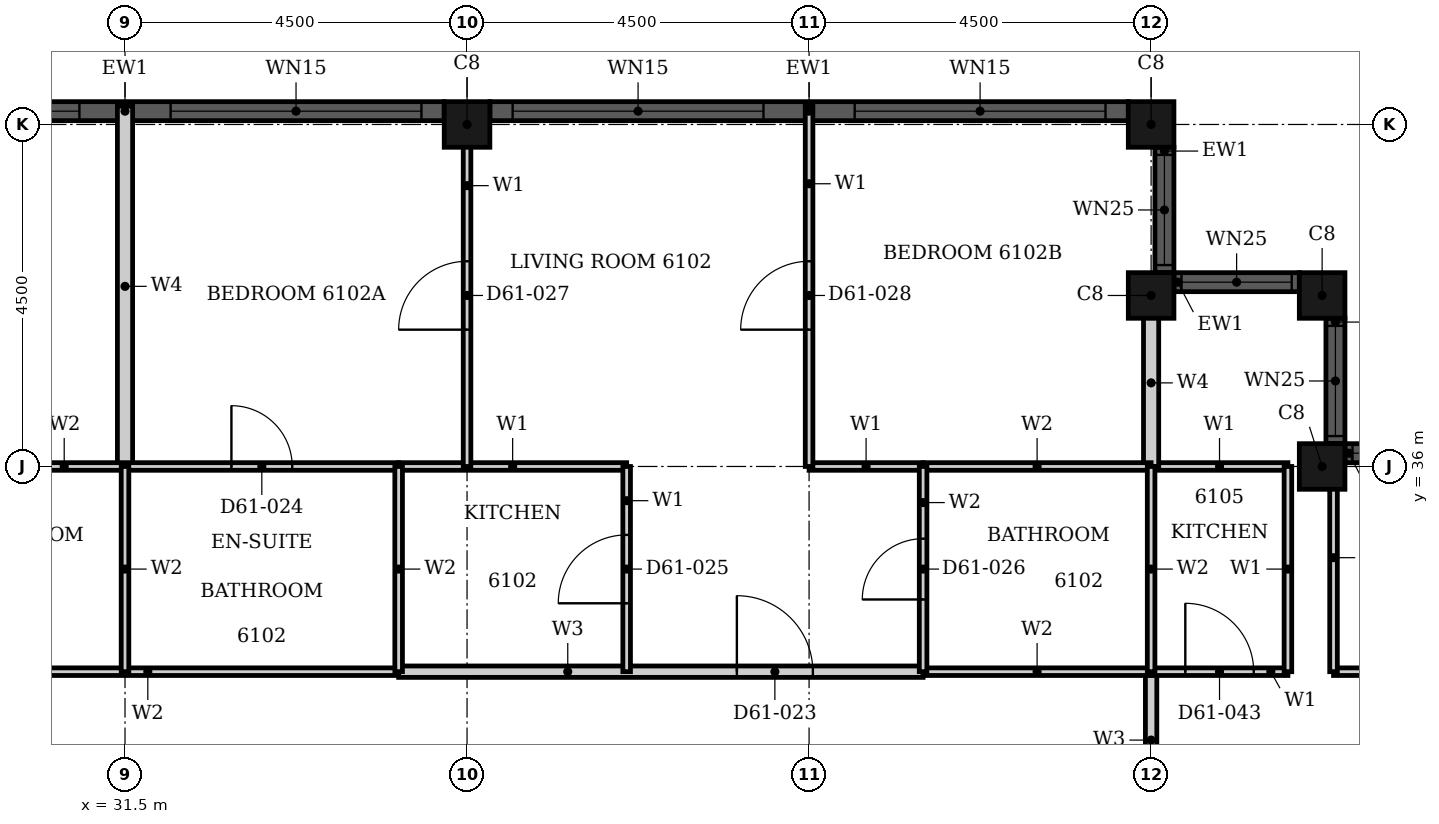
"""IFC4 building model, lengths in metres.
Left out: names, types, materials, properties, quantities, classifications, styles, units other than length and angle.
Written with IfcOpenShell. Run it as: python <this file> out.ifc"""

import sys

from ifc_helpers import new_model, si_unit, direction, frame, frame_2d, origin, origin_2d, place, context, subcontext, project, spatial, rectangle, hollow_rectangle, extrude, element, fill, save


model = new_model("IFC4")
c1 = context("Model", 3, precision=1e-05, world=origin(), true_north=direction((0.0, 1.0)))
c2 = subcontext(c1, "Body", "Model", "MODEL_VIEW")
j1 = project(units=[si_unit("LENGTHUNIT", "METRE"), si_unit("PLANEANGLEUNIT", "RADIAN")], contexts=[c1])
p1 = place(None, origin())
s1 = spatial("IfcSite", under=j1, at=p1, CompositionType="ELEMENT")
p2 = place(p1, origin())
s2 = spatial("IfcBuilding", under=s1, at=p2, CompositionType="ELEMENT")
p3 = place(p2, frame((0.0, 0.0, 241.6)))
s3 = spatial("IfcBuildingStorey", under=s2, at=p3, CompositionType="ELEMENT", Elevation=241.6)
for number, where, z_axis, x_axis in (
    (1, (47.25, 36.0, 0.0), (0.0, 0.0, 1.0), (1.0, 0.0, 0.0)),
    (2, (47.25, 38.25, 0.0), (0.0, 0.0, 1.0), (1.0, 0.0, 0.0)),
    (3, (45.0, 38.25, 0.0), (0.0, 0.0, 1.0), (1.0, 0.0, 0.0)),
    (4, (45.0, 40.5, 0.0), (0.0, 0.0, 1.0), (1.0, 0.0, 0.0)),
    (5, (36.0, 40.5, 0.0), (0.0, 0.0, 1.0), (1.0, 0.0, 0.0)),
):
    element("IfcColumn", number, at=place(p3, frame(where, z_axis=z_axis, x_axis=x_axis)), inside=s3, PredefinedType="COLUMN", context=c2, shape_type="SweptSolid", body=[
        extrude(hollow_rectangle(XDim=0.6, YDim=0.6, WallThickness=0.02, at=origin_2d()), origin(), (0.0, 0.0, 1.0), 3.7),
    ])
p4 = place(p3, frame((49.2, 36.175, 0.0), z_axis=(0.0, 0.0, 1.0), x_axis=(-1.0, 0.0, 0.0)))
e6 = element("IfcWall", 6, at=p4, inside=s3, PredefinedType="SOLIDWALL", context=c2, shape_type="SweptSolid", body=[
    extrude(rectangle(XDim=1.65, YDim=0.25, at=frame_2d((0.825, 0.0))), origin(), (0.0, 0.0, 1.0), 3.7),
])
p5 = place(p4, frame((0.1, 0.0, 0.9)))
e7 = element("IfcOpeningElement", 7, at=p5, cuts=e6, PredefinedType="OPENING", context=c2, shape_type="SweptSolid", body=[
    extrude(rectangle(XDim=1.45, YDim=1.85, at=frame_2d((0.725, 0.925))), frame((0.0, 0.135, 0.0), z_axis=(0.0, -1.0, 0.0), x_axis=(1.0, 0.0, 0.0)), (0.0, 0.0, 1.0), 0.27),
])
p6 = place(p3, frame((47.425, 36.3, 0.0), z_axis=(0.0, 0.0, 1.0), x_axis=(0.0, 1.0, 0.0)))
e8 = element("IfcWall", 8, at=p6, inside=s3, PredefinedType="SOLIDWALL", context=c2, shape_type="SweptSolid", body=[
    extrude(rectangle(XDim=1.65, YDim=0.25, at=frame_2d((0.825, 0.0))), origin(), (0.0, 0.0, 1.0), 3.7),
])
p7 = place(p6, frame((0.1, 0.0, 0.9)))
e9 = element("IfcOpeningElement", 9, at=p7, cuts=e8, PredefinedType="OPENING", context=c2, shape_type="SweptSolid", body=[
    extrude(rectangle(XDim=1.45, YDim=1.85, at=frame_2d((0.725, 0.925))), frame((0.0, 0.135, 0.0), z_axis=(0.0, -1.0, 0.0), x_axis=(1.0, 0.0, 0.0)), (0.0, 0.0, 1.0), 0.27),
])
p8 = place(p3, frame((46.95, 38.425, 0.0), z_axis=(0.0, 0.0, 1.0), x_axis=(-1.0, 0.0, 0.0)))
e10 = element("IfcWall", 10, at=p8, inside=s3, PredefinedType="SOLIDWALL", context=c2, shape_type="SweptSolid", body=[
    extrude(rectangle(XDim=1.65, YDim=0.25, at=frame_2d((0.825, 0.0))), origin(), (0.0, 0.0, 1.0), 3.7),
])
p9 = place(p8, frame((0.1, 0.0, 0.9)))
e11 = element("IfcOpeningElement", 11, at=p9, cuts=e10, PredefinedType="OPENING", context=c2, shape_type="SweptSolid", body=[
    extrude(rectangle(XDim=1.45, YDim=1.85, at=frame_2d((0.725, 0.925))), frame((0.0, 0.135, 0.0), z_axis=(0.0, -1.0, 0.0), x_axis=(1.0, 0.0, 0.0)), (0.0, 0.0, 1.0), 0.27),
])
p10 = place(p3, frame((45.175, 38.55, 0.0), z_axis=(0.0, 0.0, 1.0), x_axis=(0.0, 1.0, 0.0)))
e12 = element("IfcWall", 12, at=p10, inside=s3, PredefinedType="SOLIDWALL", context=c2, shape_type="SweptSolid", body=[
    extrude(rectangle(XDim=1.65, YDim=0.25, at=frame_2d((0.825, 0.0))), origin(), (0.0, 0.0, 1.0), 3.7),
])
p11 = place(p10, frame((0.1, 0.0, 0.9)))
e13 = element("IfcOpeningElement", 13, at=p11, cuts=e12, PredefinedType="OPENING", context=c2, shape_type="SweptSolid", body=[
    extrude(rectangle(XDim=1.45, YDim=1.85, at=frame_2d((0.725, 0.925))), frame((0.0, 0.135, 0.0), z_axis=(0.0, -1.0, 0.0), x_axis=(1.0, 0.0, 0.0)), (0.0, 0.0, 1.0), 0.27),
])
p12 = place(p3, frame((44.7, 40.675, 0.0), z_axis=(0.0, 0.0, 1.0), x_axis=(-1.0, 0.0, 0.0)))
e14 = element("IfcWall", 14, at=p12, inside=s3, PredefinedType="SOLIDWALL", context=c2, shape_type="SweptSolid", body=[
    extrude(rectangle(XDim=8.4, YDim=0.25, at=frame_2d((4.2, 0.0))), origin(), (0.0, 0.0, 1.0), 3.7),
])
p13 = place(p12, frame((0.3, 0.0, 0.45)))
e15 = element("IfcOpeningElement", 15, at=p13, cuts=e14, PredefinedType="OPENING", context=c2, shape_type="SweptSolid", body=[
    extrude(rectangle(XDim=3.3, YDim=2.3, at=frame_2d((1.65, 1.15))), frame((0.0, 0.135, 0.0), z_axis=(0.0, -1.0, 0.0), x_axis=(1.0, 0.0, 0.0)), (0.0, 0.0, 1.0), 0.27),
])
p14 = place(p12, frame((4.8, 0.0, 0.45)))
e16 = element("IfcOpeningElement", 16, at=p14, cuts=e14, PredefinedType="OPENING", context=c2, shape_type="SweptSolid", body=[
    extrude(rectangle(XDim=3.3, YDim=2.3, at=frame_2d((1.65, 1.15))), frame((0.0, 0.135, 0.0), z_axis=(0.0, -1.0, 0.0), x_axis=(1.0, 0.0, 0.0)), (0.0, 0.0, 1.0), 0.27),
])
p15 = place(p3, frame((35.7, 40.675, 0.0), z_axis=(0.0, 0.0, 1.0), x_axis=(-1.0, 0.0, 0.0)))
e17 = element("IfcWall", 17, at=p15, inside=s3, PredefinedType="SOLIDWALL", context=c2, shape_type="SweptSolid", body=[
    extrude(rectangle(XDim=8.4, YDim=0.25, at=frame_2d((4.2, 0.0))), origin(), (0.0, 0.0, 1.0), 3.7),
])
p16 = place(p15, frame((0.3, 0.0, 0.45)))
e18 = element("IfcOpeningElement", 18, at=p16, cuts=e17, PredefinedType="OPENING", context=c2, shape_type="SweptSolid", body=[
    extrude(rectangle(XDim=3.3, YDim=2.3, at=frame_2d((1.65, 1.15))), frame((0.0, 0.135, 0.0), z_axis=(0.0, -1.0, 0.0), x_axis=(1.0, 0.0, 0.0)), (0.0, 0.0, 1.0), 0.27),
])
p17 = place(p15, frame((4.8, 0.0, 0.45)))
e19 = element("IfcOpeningElement", 19, at=p17, cuts=e17, PredefinedType="OPENING", context=c2, shape_type="SweptSolid", body=[
    extrude(rectangle(XDim=3.3, YDim=2.3, at=frame_2d((1.65, 1.15))), frame((0.0, 0.135, 0.0), z_axis=(0.0, -1.0, 0.0), x_axis=(1.0, 0.0, 0.0)), (0.0, 0.0, 1.0), 0.27),
])
p18 = place(p3, frame((35.1, 33.3, 0.0), z_axis=(0.0, 0.0, 1.0), x_axis=(1.0, 0.0, 0.0)))
e20 = element("IfcWall", 20, at=p18, inside=s3, PredefinedType="PARTITIONING", context=c2, shape_type="SweptSolid", body=[
    extrude(rectangle(XDim=6.9, YDim=0.15, at=frame_2d((3.45, 0.0))), origin(), (0.0, 0.0, 1.0), 3.4),
])
p19 = place(p18, frame((4.45, 0.0, 0.0)))
e21 = element("IfcOpeningElement", 21, at=p19, cuts=e20, PredefinedType="OPENING", context=c2, shape_type="SweptSolid", body=[
    extrude(rectangle(XDim=1.0, YDim=2.2, at=frame_2d((0.5, 1.1))), frame((0.0, 0.085, 0.0), z_axis=(0.0, -1.0, 0.0), x_axis=(1.0, 0.0, 0.0)), (0.0, 0.0, 1.0), 0.17),
])
p20 = place(p3, frame((45.0, 31.5, 0.0), z_axis=(0.0, 0.0, 1.0), x_axis=(0.0, 1.0, 0.0)))
e22 = element("IfcWall", 22, at=p20, inside=s3, PredefinedType="PARTITIONING", context=c2, shape_type="SweptSolid", body=[
    extrude(rectangle(XDim=1.8, YDim=0.15, at=frame_2d((0.9, 0.0))), origin(), (0.0, 0.0, 1.0), 3.4),
])
p21 = place(p3, frame((45.0, 33.3, 0.0), z_axis=(0.0, 0.0, 1.0), x_axis=(1.0, 0.0, 0.0)))
e23 = element("IfcWall", 23, at=p21, inside=s3, PredefinedType="PARTITIONING", context=c2, shape_type="SweptSolid", body=[
    extrude(rectangle(XDim=1.8, YDim=0.1, at=frame_2d((0.9, 0.0))), origin(), (0.0, 0.0, 1.0), 3.4),
])
p22 = place(p21, frame((0.45, 0.0, 0.0)))
e24 = element("IfcOpeningElement", 24, at=p22, cuts=e23, PredefinedType="OPENING", context=c2, shape_type="SweptSolid", body=[
    extrude(rectangle(XDim=0.9, YDim=2.1, at=frame_2d((0.45, 1.05))), frame((0.0, 0.06, 0.0), z_axis=(0.0, -1.0, 0.0), x_axis=(1.0, 0.0, 0.0)), (0.0, 0.0, 1.0), 0.12),
])
p23 = place(p3, frame((40.5, 36.0, 0.0), z_axis=(0.0, 0.0, 1.0), x_axis=(1.0, 0.0, 0.0)))
e25 = element("IfcWall", 25, at=p23, inside=s3, PredefinedType="PARTITIONING", context=c2, shape_type="SweptSolid", body=[
    extrude(rectangle(XDim=1.5, YDim=0.1, at=frame_2d((0.75, 0.0))), origin(), (0.0, 0.0, 1.0), 3.4),
])
p24 = place(p3, frame((35.1, 36.0, 0.0), z_axis=(0.0, 0.0, 1.0), x_axis=(1.0, 0.0, 0.0)))
e26 = element("IfcWall", 26, at=p24, inside=s3, PredefinedType="PARTITIONING", context=c2, shape_type="SweptSolid", body=[
    extrude(rectangle(XDim=3.0, YDim=0.1, at=frame_2d((1.5, 0.0))), origin(), (0.0, 0.0, 1.0), 3.4),
])
p25 = place(p3, frame((45.0, 36.0, 0.0), z_axis=(0.0, 0.0, 1.0), x_axis=(1.0, 0.0, 0.0)))
e27 = element("IfcWall", 27, at=p25, inside=s3, PredefinedType="PARTITIONING", context=c2, shape_type="SweptSolid", body=[
    extrude(rectangle(XDim=1.8, YDim=0.1, at=frame_2d((0.9, 0.0))), origin(), (0.0, 0.0, 1.0), 3.4),
])
p26 = place(p3, frame((36.0, 36.0, 0.0), z_axis=(0.0, 0.0, 1.0), x_axis=(0.0, 1.0, 0.0)))
e28 = element("IfcWall", 28, at=p26, inside=s3, PredefinedType="PARTITIONING", context=c2, shape_type="SweptSolid", body=[
    extrude(rectangle(XDim=4.69, YDim=0.1, at=frame_2d((2.345, 0.0))), origin(), (0.0, 0.0, 1.0), 3.4),
])
p27 = place(p26, frame((1.8, 0.0, 0.0)))
e29 = element("IfcOpeningElement", 29, at=p27, cuts=e28, PredefinedType="OPENING", context=c2, shape_type="SweptSolid", body=[
    extrude(rectangle(XDim=0.9, YDim=2.1, at=frame_2d((0.45, 1.05))), frame((0.0, 0.06, 0.0), z_axis=(0.0, -1.0, 0.0), x_axis=(1.0, 0.0, 0.0)), (0.0, 0.0, 1.0), 0.12),
])
p28 = place(p3, frame((38.1, 33.3, 0.0), z_axis=(0.0, 0.0, 1.0), x_axis=(0.0, 1.0, 0.0)))
e30 = element("IfcWall", 30, at=p28, inside=s3, PredefinedType="PARTITIONING", context=c2, shape_type="SweptSolid", body=[
    extrude(rectangle(XDim=2.7, YDim=0.1, at=frame_2d((1.35, 0.0))), origin(), (0.0, 0.0, 1.0), 3.4),
])
p29 = place(p28, frame((0.9, 0.0, 0.0)))
e31 = element("IfcOpeningElement", 31, at=p29, cuts=e30, PredefinedType="OPENING", context=c2, shape_type="SweptSolid", body=[
    extrude(rectangle(XDim=0.9, YDim=2.1, at=frame_2d((0.45, 1.05))), frame((0.0, 0.06, 0.0), z_axis=(0.0, -1.0, 0.0), x_axis=(1.0, 0.0, 0.0)), (0.0, 0.0, 1.0), 0.12),
])
p30 = place(p3, frame((40.5, 36.0, 0.0), z_axis=(0.0, 0.0, 1.0), x_axis=(0.0, 1.0, 0.0)))
e32 = element("IfcWall", 32, at=p30, inside=s3, PredefinedType="PARTITIONING", context=c2, shape_type="SweptSolid", body=[
    extrude(rectangle(XDim=4.74, YDim=0.1, at=frame_2d((2.37, 0.0))), origin(), (0.0, 0.0, 1.0), 3.4),
])
p31 = place(p30, frame((1.8, 0.0, 0.0)))
e33 = element("IfcOpeningElement", 33, at=p31, cuts=e32, PredefinedType="OPENING", context=c2, shape_type="SweptSolid", body=[
    extrude(rectangle(XDim=0.9, YDim=2.1, at=frame_2d((0.45, 1.05))), frame((0.0, 0.06, 0.0), z_axis=(0.0, -1.0, 0.0), x_axis=(1.0, 0.0, 0.0)), (0.0, 0.0, 1.0), 0.12),
])
p32 = place(p3, frame((46.8, 33.3, 0.0), z_axis=(0.0, 0.0, 1.0), x_axis=(0.0, 1.0, 0.0)))
e34 = element("IfcWall", 34, at=p32, inside=s3, PredefinedType="PARTITIONING", context=c2, shape_type="SweptSolid", body=[
    extrude(rectangle(XDim=2.7, YDim=0.1, at=frame_2d((1.35, 0.0))), origin(), (0.0, 0.0, 1.0), 3.4),
])
p33 = place(p3, frame((31.5, 36.0, 0.0), z_axis=(0.0, 0.0, 1.0), x_axis=(0.0, 1.0, 0.0)))
e35 = element("IfcWall", 35, at=p33, inside=s3, PredefinedType="PARTITIONING", context=c2, shape_type="SweptSolid", body=[
    extrude(rectangle(XDim=4.74, YDim=0.2, at=frame_2d((2.37, 0.0))), origin(), (0.0, 0.0, 1.0), 3.4),
])
p34 = place(p3, frame((45.0, 36.0, 0.0), z_axis=(0.0, 0.0, 1.0), x_axis=(0.0, 1.0, 0.0)))
e36 = element("IfcWall", 36, at=p34, inside=s3, PredefinedType="PARTITIONING", context=c2, shape_type="SweptSolid", body=[
    extrude(rectangle(XDim=2.2, YDim=0.2, at=frame_2d((1.1, 0.0))), origin(), (0.0, 0.0, 1.0), 3.4),
])
p35 = place(p3, frame((28.5, 33.3, 0.0), z_axis=(0.0, 0.0, 1.0), x_axis=(1.0, 0.0, 0.0)))
e37 = element("IfcWall", 37, at=p35, inside=s3, PredefinedType="PARTITIONING", context=c2, shape_type="SweptSolid", body=[
    extrude(rectangle(XDim=6.6, YDim=0.1, at=frame_2d((3.3, 0.0))), origin(), (0.0, 0.0, 1.0), 3.4),
])
p36 = place(p3, frame((42.0, 33.3, 0.0), z_axis=(0.0, 0.0, 1.0), x_axis=(1.0, 0.0, 0.0)))
e38 = element("IfcWall", 38, at=p36, inside=s3, PredefinedType="PARTITIONING", context=c2, shape_type="SweptSolid", body=[
    extrude(rectangle(XDim=3.0, YDim=0.1, at=frame_2d((1.5, 0.0))), origin(), (0.0, 0.0, 1.0), 3.4),
])
p37 = place(p3, frame((47.4, 33.3, 0.0), z_axis=(0.0, 0.0, 1.0), x_axis=(1.0, 0.0, 0.0)))
e39 = element("IfcWall", 39, at=p37, inside=s3, PredefinedType="PARTITIONING", context=c2, shape_type="SweptSolid", body=[
    extrude(rectangle(XDim=2.15, YDim=0.1, at=frame_2d((1.075, 0.0))), origin(), (0.0, 0.0, 1.0), 3.4),
])
p38 = place(p37, frame((0.65, 0.0, 0.0)))
e40 = element("IfcOpeningElement", 40, at=p38, cuts=e39, PredefinedType="OPENING", context=c2, shape_type="SweptSolid", body=[
    extrude(rectangle(XDim=0.8, YDim=2.1, at=frame_2d((0.4, 1.05))), frame((0.0, 0.06, 0.0), z_axis=(0.0, -1.0, 0.0), x_axis=(1.0, 0.0, 0.0)), (0.0, 0.0, 1.0), 0.12),
])
p39 = place(p3, frame((28.5, 36.0, 0.0), z_axis=(0.0, 0.0, 1.0), x_axis=(1.0, 0.0, 0.0)))
e41 = element("IfcWall", 41, at=p39, inside=s3, PredefinedType="PARTITIONING", context=c2, shape_type="SweptSolid", body=[
    extrude(rectangle(XDim=6.6, YDim=0.1, at=frame_2d((3.3, 0.0))), origin(), (0.0, 0.0, 1.0), 3.4),
])
p40 = place(p39, frame((4.4, 0.0, 0.0)))
e42 = element("IfcOpeningElement", 42, at=p40, cuts=e41, PredefinedType="OPENING", context=c2, shape_type="SweptSolid", body=[
    extrude(rectangle(XDim=0.8, YDim=2.1, at=frame_2d((0.4, 1.05))), frame((0.0, 0.06, 0.0), z_axis=(0.0, -1.0, 0.0), x_axis=(1.0, 0.0, 0.0)), (0.0, 0.0, 1.0), 0.12),
])
p41 = place(p3, frame((42.0, 36.0, 0.0), z_axis=(0.0, 0.0, 1.0), x_axis=(1.0, 0.0, 0.0)))
e43 = element("IfcWall", 43, at=p41, inside=s3, PredefinedType="PARTITIONING", context=c2, shape_type="SweptSolid", body=[
    extrude(rectangle(XDim=3.0, YDim=0.1, at=frame_2d((1.5, 0.0))), origin(), (0.0, 0.0, 1.0), 3.4),
])
for number, where, z_axis, x_axis in (
    (44, (31.5, 33.3, 0.0), (0.0, 0.0, 1.0), (0.0, 1.0, 0.0)),
    (45, (35.1, 33.3, 0.0), (0.0, 0.0, 1.0), (0.0, 1.0, 0.0)),
):
    element("IfcWall", number, at=place(p3, frame(where, z_axis=z_axis, x_axis=x_axis)), inside=s3, PredefinedType="PARTITIONING", context=c2, shape_type="SweptSolid", body=[
        extrude(rectangle(XDim=2.7, YDim=0.1, at=frame_2d((1.35, 0.0))), origin(), (0.0, 0.0, 1.0), 3.4),
    ])
p42 = place(p3, frame((42.0, 33.3, 0.0), z_axis=(0.0, 0.0, 1.0), x_axis=(0.0, 1.0, 0.0)))
e46 = element("IfcWall", 46, at=p42, inside=s3, PredefinedType="PARTITIONING", context=c2, shape_type="SweptSolid", body=[
    extrude(rectangle(XDim=2.7, YDim=0.1, at=frame_2d((1.35, 0.0))), origin(), (0.0, 0.0, 1.0), 3.4),
])
p43 = place(p42, frame((0.95, 0.0, 0.0)))
e47 = element("IfcOpeningElement", 47, at=p43, cuts=e46, PredefinedType="OPENING", context=c2, shape_type="SweptSolid", body=[
    extrude(rectangle(XDim=0.8, YDim=2.1, at=frame_2d((0.4, 1.05))), frame((0.0, 0.06, 0.0), z_axis=(0.0, -1.0, 0.0), x_axis=(1.0, 0.0, 0.0)), (0.0, 0.0, 1.0), 0.12),
])
p44 = place(p3, frame((45.0, 33.3, 0.0), z_axis=(0.0, 0.0, 1.0), x_axis=(0.0, 1.0, 0.0)))
e48 = element("IfcWall", 48, at=p44, inside=s3, PredefinedType="PARTITIONING", context=c2, shape_type="SweptSolid", body=[
    extrude(rectangle(XDim=2.7, YDim=0.1, at=frame_2d((1.35, 0.0))), origin(), (0.0, 0.0, 1.0), 3.4),
])
p45 = place(p3, frame((47.4, 33.3, 0.0), z_axis=(0.0, 0.0, 1.0), x_axis=(0.0, 1.0, 0.0)))
e49 = element("IfcWall", 49, at=p45, inside=s3, PredefinedType="PARTITIONING", context=c2, shape_type="SweptSolid", body=[
    extrude(rectangle(XDim=3.0, YDim=0.1, at=frame_2d((1.5, 0.0))), origin(), (0.0, 0.0, 1.0), 3.4),
])
p46 = place(p5, origin())
e50 = element("IfcWindow", 50, at=p46, inside=s3, PartitioningType="SINGLE_PANEL", PredefinedType="WINDOW", context=c2, shape_type="SweptSolid", body=[
    extrude(rectangle(XDim=1.45, YDim=1.85, at=frame_2d((0.725, 0.925))), frame((0.0, 0.03, 0.0), z_axis=(0.0, -1.0, 0.0), x_axis=(1.0, 0.0, 0.0)), (0.0, 0.0, 1.0), 0.06),
])
fill(e7, e50)
p47 = place(p7, origin())
e51 = element("IfcWindow", 51, at=p47, inside=s3, PartitioningType="SINGLE_PANEL", PredefinedType="WINDOW", context=c2, shape_type="SweptSolid", body=[
    extrude(rectangle(XDim=1.45, YDim=1.85, at=frame_2d((0.725, 0.925))), frame((0.0, 0.03, 0.0), z_axis=(0.0, -1.0, 0.0), x_axis=(1.0, 0.0, 0.0)), (0.0, 0.0, 1.0), 0.06),
])
fill(e9, e51)
p48 = place(p9, origin())
e52 = element("IfcWindow", 52, at=p48, inside=s3, PartitioningType="SINGLE_PANEL", PredefinedType="WINDOW", context=c2, shape_type="SweptSolid", body=[
    extrude(rectangle(XDim=1.45, YDim=1.85, at=frame_2d((0.725, 0.925))), frame((0.0, 0.03, 0.0), z_axis=(0.0, -1.0, 0.0), x_axis=(1.0, 0.0, 0.0)), (0.0, 0.0, 1.0), 0.06),
])
fill(e11, e52)
p49 = place(p11, origin())
e53 = element("IfcWindow", 53, at=p49, inside=s3, PartitioningType="SINGLE_PANEL", PredefinedType="WINDOW", context=c2, shape_type="SweptSolid", body=[
    extrude(rectangle(XDim=1.45, YDim=1.85, at=frame_2d((0.725, 0.925))), frame((0.0, 0.03, 0.0), z_axis=(0.0, -1.0, 0.0), x_axis=(1.0, 0.0, 0.0)), (0.0, 0.0, 1.0), 0.06),
])
fill(e13, e53)
p50 = place(p13, origin())
e54 = element("IfcWindow", 54, at=p50, inside=s3, PartitioningType="SINGLE_PANEL", PredefinedType="WINDOW", context=c2, shape_type="SweptSolid", body=[
    extrude(rectangle(XDim=3.3, YDim=2.3, at=frame_2d((1.65, 1.15))), frame((0.0, 0.03, 0.0), z_axis=(0.0, -1.0, 0.0), x_axis=(1.0, 0.0, 0.0)), (0.0, 0.0, 1.0), 0.06),
])
fill(e15, e54)
p51 = place(p14, origin())
e55 = element("IfcWindow", 55, at=p51, inside=s3, PartitioningType="SINGLE_PANEL", PredefinedType="WINDOW", context=c2, shape_type="SweptSolid", body=[
    extrude(rectangle(XDim=3.3, YDim=2.3, at=frame_2d((1.65, 1.15))), frame((0.0, 0.03, 0.0), z_axis=(0.0, -1.0, 0.0), x_axis=(1.0, 0.0, 0.0)), (0.0, 0.0, 1.0), 0.06),
])
fill(e16, e55)
p52 = place(p16, origin())
e56 = element("IfcWindow", 56, at=p52, inside=s3, PartitioningType="SINGLE_PANEL", PredefinedType="WINDOW", context=c2, shape_type="SweptSolid", body=[
    extrude(rectangle(XDim=3.3, YDim=2.3, at=frame_2d((1.65, 1.15))), frame((0.0, 0.03, 0.0), z_axis=(0.0, -1.0, 0.0), x_axis=(1.0, 0.0, 0.0)), (0.0, 0.0, 1.0), 0.06),
])
fill(e18, e56)
p53 = place(p17, origin())
e57 = element("IfcWindow", 57, at=p53, inside=s3, PartitioningType="SINGLE_PANEL", PredefinedType="WINDOW", context=c2, shape_type="SweptSolid", body=[
    extrude(rectangle(XDim=3.3, YDim=2.3, at=frame_2d((1.65, 1.15))), frame((0.0, 0.03, 0.0), z_axis=(0.0, -1.0, 0.0), x_axis=(1.0, 0.0, 0.0)), (0.0, 0.0, 1.0), 0.06),
])
fill(e19, e57)
p54 = place(p19, origin())
e58 = element("IfcDoor", 58, at=p54, inside=s3, OperationType="SINGLE_SWING_LEFT", PredefinedType="DOOR", context=c2, shape_type="SweptSolid", body=[
    extrude(rectangle(XDim=1.0, YDim=2.2, at=frame_2d((0.5, 1.1))), frame((0.0, 0.025, 0.0), z_axis=(0.0, -1.0, 0.0), x_axis=(1.0, 0.0, 0.0)), (0.0, 0.0, 1.0), 0.05),
])
fill(e21, e58)
p55 = place(p40, origin())
e59 = element("IfcDoor", 59, at=p55, inside=s3, OperationType="SINGLE_SWING_RIGHT", PredefinedType="DOOR", context=c2, shape_type="SweptSolid", body=[
    extrude(rectangle(XDim=0.8, YDim=2.1, at=frame_2d((0.4, 1.05))), frame((0.0, 0.025, 0.0), z_axis=(0.0, -1.0, 0.0), x_axis=(1.0, 0.0, 0.0)), (0.0, 0.0, 1.0), 0.05),
])
fill(e42, e59)
p56 = place(p29, origin())
e60 = element("IfcDoor", 60, at=p56, inside=s3, OperationType="SINGLE_SWING_RIGHT", PredefinedType="DOOR", context=c2, shape_type="SweptSolid", body=[
    extrude(rectangle(XDim=0.9, YDim=2.1, at=frame_2d((0.45, 1.05))), frame((0.0, 0.025, 0.0), z_axis=(0.0, -1.0, 0.0), x_axis=(1.0, 0.0, 0.0)), (0.0, 0.0, 1.0), 0.05),
])
fill(e31, e60)
p57 = place(p43, origin())
e61 = element("IfcDoor", 61, at=p57, inside=s3, OperationType="SINGLE_SWING_LEFT", PredefinedType="DOOR", context=c2, shape_type="SweptSolid", body=[
    extrude(rectangle(XDim=0.8, YDim=2.1, at=frame_2d((0.4, 1.05))), frame((0.0, 0.025, 0.0), z_axis=(0.0, -1.0, 0.0), x_axis=(1.0, 0.0, 0.0)), (0.0, 0.0, 1.0), 0.05),
])
fill(e47, e61)
p58 = place(p27, origin())
e62 = element("IfcDoor", 62, at=p58, inside=s3, OperationType="SINGLE_SWING_RIGHT", PredefinedType="DOOR", context=c2, shape_type="SweptSolid", body=[
    extrude(rectangle(XDim=0.9, YDim=2.1, at=frame_2d((0.45, 1.05))), frame((0.0, 0.025, 0.0), z_axis=(0.0, -1.0, 0.0), x_axis=(1.0, 0.0, 0.0)), (0.0, 0.0, 1.0), 0.05),
])
fill(e29, e62)
p59 = place(p31, origin())
e63 = element("IfcDoor", 63, at=p59, inside=s3, OperationType="SINGLE_SWING_RIGHT", PredefinedType="DOOR", context=c2, shape_type="SweptSolid", body=[
    extrude(rectangle(XDim=0.9, YDim=2.1, at=frame_2d((0.45, 1.05))), frame((0.0, 0.025, 0.0), z_axis=(0.0, -1.0, 0.0), x_axis=(1.0, 0.0, 0.0)), (0.0, 0.0, 1.0), 0.05),
])
fill(e33, e63)
p60 = place(p22, origin())
e64 = element("IfcDoor", 64, at=p60, inside=s3, OperationType="SINGLE_SWING_LEFT", PredefinedType="DOOR", context=c2, shape_type="SweptSolid", body=[
    extrude(rectangle(XDim=0.9, YDim=2.1, at=frame_2d((0.45, 1.05))), frame((0.0, 0.025, 0.0), z_axis=(0.0, -1.0, 0.0), x_axis=(1.0, 0.0, 0.0)), (0.0, 0.0, 1.0), 0.05),
])
fill(e24, e64)
save(model, sys.argv[1])
